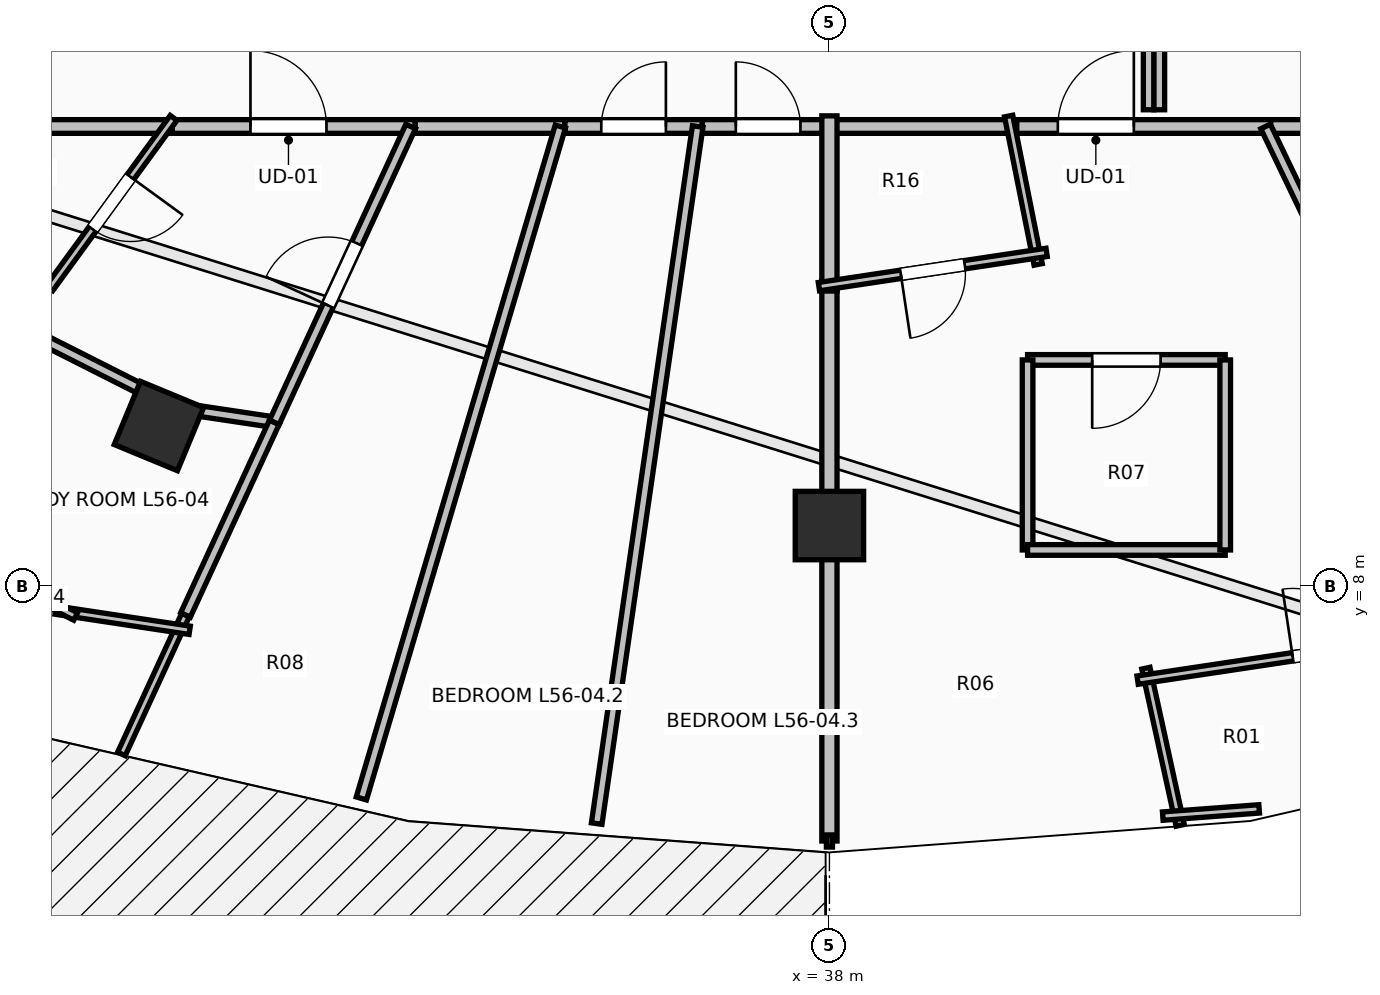
"""IFC4 building model, lengths in metres.
Left out: names, types, materials, properties, quantities, classifications, styles, units other than length and angle.
Written with IfcOpenShell. Run it as: python <this file> out.ifc"""

import sys

from ifc_helpers import new_model, si_unit, direction, frame, frame_2d, origin, origin_2d, place, context, subcontext, project, spatial, rectangle, extrude, element, fill, save


model = new_model("IFC4")
c1 = context("Model", 3, precision=1e-05, world=origin(), true_north=direction((0.0, 1.0)))
c2 = subcontext(c1, "Body", "Model", "MODEL_VIEW")
j1 = project(units=[si_unit("LENGTHUNIT", "METRE"), si_unit("PLANEANGLEUNIT", "RADIAN")], contexts=[c1])
p1 = place(None, origin())
s1 = spatial("IfcSite", under=j1, at=p1, CompositionType="ELEMENT")
p2 = place(p1, origin())
s2 = spatial("IfcBuilding", under=s1, at=p2, CompositionType="ELEMENT")
p3 = place(p2, frame((0.0, 0.0, 207.2)))
s3 = spatial("IfcBuildingStorey", under=s2, at=p3, CompositionType="ELEMENT", Elevation=207.2)
for number, where, z_axis, x_axis in (
    (1, (29.179, 10.109, 0.0), (0.0, 0.0, 1.0), (-0.383, -0.924, 0.0)),
    (2, (38.0, 8.8, 0.0), (0.0, 0.0, 1.0), (0.0, -1.0, 0.0)),
):
    element("IfcColumn", number, at=place(p3, frame(where, z_axis=z_axis, x_axis=x_axis)), inside=s3, PredefinedType="COLUMN", context=c2, shape_type="SweptSolid", body=[
        extrude(rectangle(XDim=0.9, YDim=0.9, at=origin_2d()), origin(), (0.0, 0.0, 1.0), 3.55),
    ])
p4 = place(p3, frame((29.215, 14.05, 0.0), z_axis=(0.0, 0.0, 1.0), x_axis=(1.0, 0.0, 0.0)))
e3 = element("IfcWall", 3, at=p4, inside=s3, PredefinedType="PARTITIONING", context=c2, shape_type="SweptSolid", body=[
    extrude(rectangle(XDim=3.336, YDim=0.18, at=frame_2d((1.668, 0.0))), origin(), (0.0, 0.0, 1.0), 2.936),
])
p5 = place(p4, frame((1.168, 0.0, 0.0)))
e4 = element("IfcOpeningElement", 4, at=p5, cuts=e3, PredefinedType="OPENING", context=c2, shape_type="SweptSolid", body=[
    extrude(rectangle(XDim=1.0, YDim=2.15, at=frame_2d((0.5, 1.075))), frame((0.0, 0.105, 0.0), z_axis=(0.0, -1.0, 0.0), x_axis=(1.0, 0.0, 0.0)), (0.0, 0.0, 1.0), 0.21),
])
p6 = place(p3, frame((25.97, 14.05, 0.0), z_axis=(0.0, 0.0, 1.0), x_axis=(1.0, 0.0, 0.0)))
e5 = element("IfcWall", 5, at=p6, inside=s3, PredefinedType="PARTITIONING", context=c2, shape_type="SweptSolid", body=[
    extrude(rectangle(XDim=3.385, YDim=0.18, at=frame_2d((1.692, 0.0))), origin(), (0.0, 0.0, 1.0), 2.482),
])
p7 = place(p3, frame((32.551, 14.05, 0.0), z_axis=(0.0, 0.0, 1.0), x_axis=(1.0, 0.0, 0.0)))
e6 = element("IfcWall", 6, at=p7, inside=s3, PredefinedType="PARTITIONING", context=c2, shape_type="SweptSolid", body=[
    extrude(rectangle(XDim=1.969, YDim=0.18, at=frame_2d((0.984, 0.0))), origin(), (0.0, 0.0, 1.0), 2.936),
])
p8 = place(p3, frame((34.52, 14.05, 0.0), z_axis=(0.0, 0.0, 1.0), x_axis=(1.0, 0.0, 0.0)))
e7 = element("IfcWall", 7, at=p8, inside=s3, PredefinedType="PARTITIONING", context=c2, shape_type="SweptSolid", body=[
    extrude(rectangle(XDim=1.807, YDim=0.18, at=frame_2d((0.903, 0.0))), origin(), (0.0, 0.0, 1.0), 2.936),
])
p9 = place(p8, frame((0.479, 0.0, 0.0)))
e8 = element("IfcOpeningElement", 8, at=p9, cuts=e7, PredefinedType="OPENING", context=c2, shape_type="SweptSolid", body=[
    extrude(rectangle(XDim=0.85, YDim=2.1, at=frame_2d((0.425, 1.05))), frame((0.0, 0.105, 0.0), z_axis=(0.0, -1.0, 0.0), x_axis=(1.0, 0.0, 0.0)), (0.0, 0.0, 1.0), 0.21),
])
p10 = place(p3, frame((36.327, 14.05, 0.0), z_axis=(0.0, 0.0, 1.0), x_axis=(1.0, 0.0, 0.0)))
e9 = element("IfcWall", 9, at=p10, inside=s3, PredefinedType="PARTITIONING", context=c2, shape_type="SweptSolid", body=[
    extrude(rectangle(XDim=1.733, YDim=0.18, at=frame_2d((0.867, 0.0))), origin(), (0.0, 0.0, 1.0), 2.936),
])
p11 = place(p10, frame((0.441, 0.0, 0.0)))
e10 = element("IfcOpeningElement", 10, at=p11, cuts=e9, PredefinedType="OPENING", context=c2, shape_type="SweptSolid", body=[
    extrude(rectangle(XDim=0.85, YDim=2.1, at=frame_2d((0.425, 1.05))), frame((0.0, 0.105, 0.0), z_axis=(0.0, -1.0, 0.0), x_axis=(1.0, 0.0, 0.0)), (0.0, 0.0, 1.0), 0.21),
])
p12 = place(p3, frame((40.325, 14.05, 0.0), z_axis=(0.0, 0.0, 1.0), x_axis=(1.0, 0.0, 0.0)))
e11 = element("IfcWall", 11, at=p12, inside=s3, PredefinedType="PARTITIONING", context=c2, shape_type="SweptSolid", body=[
    extrude(rectangle(XDim=3.48, YDim=0.18, at=frame_2d((1.74, 0.0))), origin(), (0.0, 0.0, 1.0), 2.936),
])
p13 = place(p12, frame((0.68, 0.0, 0.0)))
e12 = element("IfcOpeningElement", 12, at=p13, cuts=e11, PredefinedType="OPENING", context=c2, shape_type="SweptSolid", body=[
    extrude(rectangle(XDim=1.0, YDim=2.15, at=frame_2d((0.5, 1.075))), frame((0.0, 0.105, 0.0), z_axis=(0.0, -1.0, 0.0), x_axis=(1.0, 0.0, 0.0)), (0.0, 0.0, 1.0), 0.21),
])
p14 = place(p3, frame((37.92, 14.05, 0.0), z_axis=(0.0, 0.0, 1.0), x_axis=(1.0, 0.0, 0.0)))
e13 = element("IfcWall", 13, at=p14, inside=s3, PredefinedType="PARTITIONING", context=c2, shape_type="SweptSolid", body=[
    extrude(rectangle(XDim=2.545, YDim=0.18, at=frame_2d((1.272, 0.0))), origin(), (0.0, 0.0, 1.0), 2.936),
])
p15 = place(p3, frame((43.805, 14.05, 0.0), z_axis=(0.0, 0.0, 1.0), x_axis=(1.0, 0.0, 0.0)))
e14 = element("IfcWall", 14, at=p15, inside=s3, PredefinedType="PARTITIONING", context=c2, shape_type="SweptSolid", body=[
    extrude(rectangle(XDim=1.916, YDim=0.18, at=frame_2d((0.958, 0.0))), origin(), (0.0, 0.0, 1.0), 2.482),
])
p16 = place(p3, frame((29.372, 14.163, 0.0), z_axis=(0.0, 0.0, 1.0), x_axis=(-0.589066743954, -0.808084383693, 0.0)))
e15 = element("IfcWall", 15, at=p16, inside=s3, PredefinedType="PARTITIONING", context=c2, shape_type="SweptSolid", body=[
    extrude(rectangle(XDim=2.772, YDim=0.11, at=frame_2d((1.386, 0.0))), origin(), (0.0, 0.0, 1.0), 2.482),
])
p17 = place(p16, frame((0.961, 0.0, 0.0)))
e16 = element("IfcOpeningElement", 16, at=p17, cuts=e15, PredefinedType="OPENING", context=c2, shape_type="SweptSolid", body=[
    extrude(rectangle(XDim=0.85, YDim=2.1, at=frame_2d((0.425, 1.05))), frame((0.0, 0.07, 0.0), z_axis=(0.0, -1.0, 0.0), x_axis=(1.0, 0.0, 0.0)), (0.0, 0.0, 1.0), 0.14),
])
p18 = place(p3, frame((29.529, 7.624, 0.0), z_axis=(0.0, 0.0, 1.0), x_axis=(-0.418673802252, -0.908136689771, 0.0)))
e17 = element("IfcWall", 17, at=p18, inside=s3, PredefinedType="PARTITIONING", context=c2, shape_type="SweptSolid", body=[
    extrude(rectangle(XDim=2.014, YDim=0.11, at=frame_2d((1.007, 0.0))), origin(), (0.0, 0.0, 1.0), 3.29),
])
p19 = place(p3, frame((27.586, 11.28, 0.0), z_axis=(0.0, 0.0, 1.0), x_axis=(0.89250267167, -0.451042105643, 0.0)))
e18 = element("IfcWall", 18, at=p19, inside=s3, PredefinedType="PARTITIONING", context=c2, shape_type="SweptSolid", body=[
    extrude(rectangle(XDim=2.064, YDim=0.14, at=frame_2d((1.032, 0.0))), origin(), (0.0, 0.0, 1.0), 2.482),
])
p20 = place(p3, frame((29.428, 10.349, 0.0), z_axis=(0.0, 0.0, 1.0), x_axis=(0.988955881685, -0.148210202353, 0.0)))
e19 = element("IfcWall", 19, at=p20, inside=s3, PredefinedType="PARTITIONING", context=c2, shape_type="SweptSolid", body=[
    extrude(rectangle(XDim=1.283, YDim=0.14, at=frame_2d((0.642, 0.0))), origin(), (0.0, 0.0, 1.0), 3.29),
])
p21 = place(p3, frame((30.697, 10.159, 0.0), z_axis=(0.0, 0.0, 1.0), x_axis=(-0.41861439522, -0.908164075547, 0.0)))
e20 = element("IfcWall", 20, at=p21, inside=s3, PredefinedType="PARTITIONING", context=c2, shape_type="SweptSolid", body=[
    extrude(rectangle(XDim=2.791, YDim=0.14, at=frame_2d((1.396, 0.0))), origin(), (0.0, 0.0, 1.0), 2.824),
])
p22 = place(p3, frame((30.697, 10.159, 0.0), z_axis=(0.0, 0.0, 1.0), x_axis=(0.418635364892, 0.908154409372, 0.0)))
e21 = element("IfcWall", 21, at=p22, inside=s3, PredefinedType="PARTITIONING", context=c2, shape_type="SweptSolid", body=[
    extrude(rectangle(XDim=4.285, YDim=0.14, at=frame_2d((2.142, 0.0))), origin(), (0.0, 0.0, 1.0), 2.936),
])
p23 = place(p22, frame((1.692, 0.0, 0.0)))
e22 = element("IfcOpeningElement", 22, at=p23, cuts=e21, PredefinedType="OPENING", context=c2, shape_type="SweptSolid", body=[
    extrude(rectangle(XDim=0.9, YDim=2.1, at=frame_2d((0.45, 1.05))), frame((0.0, 0.085, 0.0), z_axis=(0.0, -1.0, 0.0), x_axis=(1.0, 0.0, 0.0)), (0.0, 0.0, 1.0), 0.17),
])
p24 = place(p3, frame((29.583, 7.422, 0.0), z_axis=(0.0, 0.0, 1.0), x_axis=(-0.988830695744, 0.149043131857, 0.0)))
e23 = element("IfcWall", 23, at=p24, inside=s3, PredefinedType="PARTITIONING", context=c2, shape_type="SweptSolid", body=[
    extrude(rectangle(XDim=1.784, YDim=0.11, at=frame_2d((0.892, 0.0))), origin(), (0.0, 0.0, 1.0), 3.29),
])
p25 = place(p3, frame((28.083, 7.604, 0.0), z_axis=(0.0, 0.0, 1.0), x_axis=(-0.892628057427, 0.450793911999, 0.0)))
e24 = element("IfcWall", 24, at=p25, inside=s3, PredefinedType="PARTITIONING", context=c2, shape_type="SweptSolid", body=[
    extrude(rectangle(XDim=2.698, YDim=0.11, at=frame_2d((1.349, 0.0))), origin(), (0.0, 0.0, 1.0), 3.29),
])
p26 = place(p3, frame((31.842, 5.21, 0.0), z_axis=(0.0, 0.0, 1.0), x_axis=(0.283952183478, 0.958838441813, 0.0)))
e25 = element("IfcWall", 25, at=p26, inside=s3, PredefinedType="PARTITIONING", context=c2, shape_type="SweptSolid", body=[
    extrude(rectangle(XDim=9.219, YDim=0.14, at=frame_2d((4.61, 0.0))), origin(), (0.0, 0.0, 1.0), 2.824),
])
p27 = place(p3, frame((34.938, 4.879, 0.0), z_axis=(0.0, 0.0, 1.0), x_axis=(0.143423836858, 0.989661357749, 0.0)))
e26 = element("IfcWall", 26, at=p27, inside=s3, PredefinedType="PARTITIONING", context=c2, shape_type="SweptSolid", body=[
    extrude(rectangle(XDim=9.267, YDim=0.14, at=frame_2d((4.633, 0.0))), origin(), (0.0, 0.0, 1.0), 2.824),
])
p28 = place(p3, frame((38.0, 4.65, 0.0), z_axis=(0.0, 0.0, 1.0), x_axis=(0.0, 1.0, 0.0)))
e27 = element("IfcWall", 27, at=p28, inside=s3, PredefinedType="PARTITIONING", context=c2, shape_type="SweptSolid", body=[
    extrude(rectangle(XDim=7.375, YDim=0.2, at=frame_2d((3.688, 0.0))), origin(), (0.0, 0.0, 1.0), 3.022),
])
p29 = place(p3, frame((38.0, 11.885, 0.0), z_axis=(0.0, 0.0, 1.0), x_axis=(0.0, 1.0, 0.0)))
e28 = element("IfcWall", 28, at=p29, inside=s3, PredefinedType="PARTITIONING", context=c2, shape_type="SweptSolid", body=[
    extrude(rectangle(XDim=2.305, YDim=0.2, at=frame_2d((1.152, 0.0))), origin(), (0.0, 0.0, 1.0), 2.936),
])
p30 = place(p3, frame((40.358, 14.187, 0.0), z_axis=(0.0, 0.0, 1.0), x_axis=(0.195313900905, -0.980740781304, 0.0)))
e29 = element("IfcWall", 29, at=p30, inside=s3, PredefinedType="PARTITIONING", context=c2, shape_type="SweptSolid", body=[
    extrude(rectangle(XDim=1.99, YDim=0.11, at=frame_2d((0.995, 0.0))), origin(), (0.0, 0.0, 1.0), 2.936),
])
p31 = place(p3, frame((40.857, 12.394, 0.0), z_axis=(0.0, 0.0, 1.0), x_axis=(-0.988873015636, -0.148762088409, 0.0)))
e30 = element("IfcWall", 30, at=p31, inside=s3, PredefinedType="PARTITIONING", context=c2, shape_type="SweptSolid", body=[
    extrude(rectangle(XDim=3.03, YDim=0.11, at=frame_2d((1.515, 0.0))), origin(), (0.0, 0.0, 1.0), 3.29),
])
p32 = place(p31, frame((1.09, 0.0, 0.0)))
e31 = element("IfcOpeningElement", 31, at=p32, cuts=e30, PredefinedType="OPENING", context=c2, shape_type="SweptSolid", body=[
    extrude(rectangle(XDim=0.85, YDim=2.1, at=frame_2d((0.425, 1.05))), frame((0.0, 0.07, 0.0), z_axis=(0.0, -1.0, 0.0), x_axis=(1.0, 0.0, 0.0)), (0.0, 0.0, 1.0), 0.14),
])
p33 = place(p3, frame((42.615, 4.856, 0.0), z_axis=(0.0, 0.0, 1.0), x_axis=(-0.213521424511, 0.976938381514, 0.0)))
e32 = element("IfcWall", 32, at=p33, inside=s3, PredefinedType="PARTITIONING", context=c2, shape_type="SweptSolid", body=[
    extrude(rectangle(XDim=2.116, YDim=0.11, at=frame_2d((1.058, 0.0))), origin(), (0.0, 0.0, 1.0), 3.29),
])
p34 = place(p3, frame((42.055, 6.766, 0.0), z_axis=(0.0, 0.0, 1.0), x_axis=(0.988872134662, 0.148767944424, 0.0)))
e33 = element("IfcWall", 33, at=p34, inside=s3, PredefinedType="PARTITIONING", context=c2, shape_type="SweptSolid", body=[
    extrude(rectangle(XDim=5.027, YDim=0.11, at=frame_2d((2.513, 0.0))), origin(), (0.0, 0.0, 1.0), 3.29),
])
p35 = place(p34, frame((2.063, 0.0, 0.0)))
e34 = element("IfcOpeningElement", 34, at=p35, cuts=e33, PredefinedType="OPENING", context=c2, shape_type="SweptSolid", body=[
    extrude(rectangle(XDim=0.9, YDim=2.1, at=frame_2d((0.45, 1.05))), frame((0.0, 0.07, 0.0), z_axis=(0.0, -1.0, 0.0), x_axis=(1.0, 0.0, 0.0)), (0.0, 0.0, 1.0), 0.14),
])
p36 = place(p3, frame((42.385, 4.978, 0.0), z_axis=(0.0, 0.0, 1.0), x_axis=(0.997207179737, 0.074684942803, 0.0)))
e35 = element("IfcWall", 35, at=p36, inside=s3, PredefinedType="PARTITIONING", context=c2, shape_type="SweptSolid", body=[
    extrude(rectangle(XDim=1.272, YDim=0.11, at=frame_2d((0.636, 0.0))), origin(), (0.0, 0.0, 1.0), 3.29),
])
p37 = place(p3, frame((43.207, 10.979, 0.0), z_axis=(0.0, 0.0, 1.0), x_axis=(-1.0, 0.0, 0.0)))
e36 = element("IfcWall", 36, at=p37, inside=s3, PredefinedType="PARTITIONING", context=c2, shape_type="SweptSolid", body=[
    extrude(rectangle(XDim=2.6, YDim=0.14, at=frame_2d((1.3, 0.0))), origin(), (0.0, 0.0, 1.0), 2.482),
])
p38 = place(p37, frame((0.85, 0.0, 0.0)))
e37 = element("IfcOpeningElement", 37, at=p38, cuts=e36, PredefinedType="OPENING", context=c2, shape_type="SweptSolid", body=[
    extrude(rectangle(XDim=0.9, YDim=2.1, at=frame_2d((0.45, 1.05))), frame((0.0, 0.085, 0.0), z_axis=(0.0, -1.0, 0.0), x_axis=(1.0, 0.0, 0.0)), (0.0, 0.0, 1.0), 0.17),
])
p39 = place(p3, frame((40.607, 10.979, 0.0), z_axis=(0.0, 0.0, 1.0), x_axis=(0.0, -1.0, 0.0)))
e38 = element("IfcWall", 38, at=p39, inside=s3, PredefinedType="PARTITIONING", context=c2, shape_type="SweptSolid", body=[
    extrude(rectangle(XDim=2.5, YDim=0.14, at=frame_2d((1.25, 0.0))), origin(), (0.0, 0.0, 1.0), 2.482),
])
p40 = place(p3, frame((40.607, 8.479, 0.0), z_axis=(0.0, 0.0, 1.0), x_axis=(1.0, 0.0, 0.0)))
e39 = element("IfcWall", 39, at=p40, inside=s3, PredefinedType="PARTITIONING", context=c2, shape_type="SweptSolid", body=[
    extrude(rectangle(XDim=2.6, YDim=0.14, at=frame_2d((1.3, 0.0))), origin(), (0.0, 0.0, 1.0), 3.29),
])
p41 = place(p3, frame((43.207, 8.479, 0.0), z_axis=(0.0, 0.0, 1.0), x_axis=(0.0, 1.0, 0.0)))
e40 = element("IfcWall", 40, at=p41, inside=s3, PredefinedType="PARTITIONING", context=c2, shape_type="SweptSolid", body=[
    extrude(rectangle(XDim=2.5, YDim=0.14, at=frame_2d((1.25, 0.0))), origin(), (0.0, 0.0, 1.0), 2.824),
])
p42 = place(p3, frame((46.887, 7.493, 0.0), z_axis=(0.0, 0.0, 1.0), x_axis=(-0.43289909466, 0.901442385204, 0.0)))
e41 = element("IfcWall", 41, at=p42, inside=s3, PredefinedType="PARTITIONING", context=c2, shape_type="SweptSolid", body=[
    extrude(rectangle(XDim=7.274, YDim=0.14, at=frame_2d((3.637, 0.0))), origin(), (0.0, 0.0, 1.0), 2.482),
])
p43 = place(p42, frame((3.187, 0.0, 0.0)))
e42 = element("IfcOpeningElement", 42, at=p43, cuts=e41, PredefinedType="OPENING", context=c2, shape_type="SweptSolid", body=[
    extrude(rectangle(XDim=0.9, YDim=2.1, at=frame_2d((0.45, 1.05))), frame((0.0, 0.085, 0.0), z_axis=(0.0, -1.0, 0.0), x_axis=(1.0, 0.0, 0.0)), (0.0, 0.0, 1.0), 0.17),
])
for number, where, z_axis, x_axis in (
    (43, (42.2, 16.1, 0.0), (0.0, 0.0, 1.0), (0.0, -1.0, 0.0)),
    (44, (42.34, 14.27, 0.0), (0.0, 0.0, 1.0), (0.0, 1.0, 0.0)),
):
    element("IfcWall", number, at=place(p3, frame(where, z_axis=z_axis, x_axis=x_axis)), inside=s3, PredefinedType="PARTITIONING", context=c2, shape_type="SweptSolid", body=[
        extrude(rectangle(XDim=1.83, YDim=0.14, at=frame_2d((0.915, 0.0))), origin(), (0.0, 0.0, 1.0), 3.29),
    ])
p44 = place(p5, origin())
e45 = element("IfcDoor", 45, at=p44, inside=s3, OperationType="SINGLE_SWING_LEFT", PredefinedType="DOOR", context=c2, shape_type="SweptSolid", body=[
    extrude(rectangle(XDim=1.0, YDim=2.15, at=frame_2d((0.5, 1.075))), frame((0.0, 0.025, 0.0), z_axis=(0.0, -1.0, 0.0), x_axis=(1.0, 0.0, 0.0)), (0.0, 0.0, 1.0), 0.05),
])
fill(e4, e45)
p45 = place(p13, origin())
e46 = element("IfcDoor", 46, at=p45, inside=s3, OperationType="SINGLE_SWING_RIGHT", PredefinedType="DOOR", context=c2, shape_type="SweptSolid", body=[
    extrude(rectangle(XDim=1.0, YDim=2.15, at=frame_2d((0.5, 1.075))), frame((0.0, 0.025, 0.0), z_axis=(0.0, -1.0, 0.0), x_axis=(1.0, 0.0, 0.0)), (0.0, 0.0, 1.0), 0.05),
])
fill(e12, e46)
p46 = place(p17, origin())
e47 = element("IfcDoor", 47, at=p46, inside=s3, OperationType="SINGLE_SWING_LEFT", PredefinedType="DOOR", context=c2, shape_type="SweptSolid", body=[
    extrude(rectangle(XDim=0.85, YDim=2.1, at=frame_2d((0.425, 1.05))), frame((0.0, 0.025, 0.0), z_axis=(0.0, -1.0, 0.0), x_axis=(1.0, 0.0, 0.0)), (0.0, 0.0, 1.0), 0.05),
])
fill(e16, e47)
p47 = place(p23, origin())
e48 = element("IfcDoor", 48, at=p47, inside=s3, OperationType="SINGLE_SWING_LEFT", PredefinedType="DOOR", context=c2, shape_type="SweptSolid", body=[
    extrude(rectangle(XDim=0.9, YDim=2.1, at=frame_2d((0.45, 1.05))), frame((0.0, 0.025, 0.0), z_axis=(0.0, -1.0, 0.0), x_axis=(1.0, 0.0, 0.0)), (0.0, 0.0, 1.0), 0.05),
])
fill(e22, e48)
p48 = place(p32, origin())
e49 = element("IfcDoor", 49, at=p48, inside=s3, OperationType="SINGLE_SWING_RIGHT", PredefinedType="DOOR", context=c2, shape_type="SweptSolid", body=[
    extrude(rectangle(XDim=0.85, YDim=2.1, at=frame_2d((0.425, 1.05))), frame((0.0, 0.025, 0.0), z_axis=(0.0, -1.0, 0.0), x_axis=(1.0, 0.0, 0.0)), (0.0, 0.0, 1.0), 0.05),
])
fill(e31, e49)
p49 = place(p35, origin())
e50 = element("IfcDoor", 50, at=p49, inside=s3, OperationType="SINGLE_SWING_LEFT", PredefinedType="DOOR", context=c2, shape_type="SweptSolid", body=[
    extrude(rectangle(XDim=0.9, YDim=2.1, at=frame_2d((0.45, 1.05))), frame((0.0, 0.025, 0.0), z_axis=(0.0, -1.0, 0.0), x_axis=(1.0, 0.0, 0.0)), (0.0, 0.0, 1.0), 0.05),
])
fill(e34, e50)
p50 = place(p38, origin())
e51 = element("IfcDoor", 51, at=p50, inside=s3, OperationType="SINGLE_SWING_RIGHT", PredefinedType="DOOR", context=c2, shape_type="SweptSolid", body=[
    extrude(rectangle(XDim=0.9, YDim=2.1, at=frame_2d((0.45, 1.05))), frame((0.0, 0.025, 0.0), z_axis=(0.0, -1.0, 0.0), x_axis=(1.0, 0.0, 0.0)), (0.0, 0.0, 1.0), 0.05),
])
fill(e37, e51)
p51 = place(p9, origin())
e52 = element("IfcDoor", 52, at=p51, inside=s3, OperationType="SINGLE_SWING_RIGHT", PredefinedType="DOOR", context=c2, shape_type="SweptSolid", body=[
    extrude(rectangle(XDim=0.85, YDim=2.1, at=frame_2d((0.425, 1.05))), frame((0.0, 0.025, 0.0), z_axis=(0.0, -1.0, 0.0), x_axis=(1.0, 0.0, 0.0)), (0.0, 0.0, 1.0), 0.05),
])
fill(e8, e52)
p52 = place(p11, origin())
e53 = element("IfcDoor", 53, at=p52, inside=s3, OperationType="SINGLE_SWING_LEFT", PredefinedType="DOOR", context=c2, shape_type="SweptSolid", body=[
    extrude(rectangle(XDim=0.85, YDim=2.1, at=frame_2d((0.425, 1.05))), frame((0.0, 0.025, 0.0), z_axis=(0.0, -1.0, 0.0), x_axis=(1.0, 0.0, 0.0)), (0.0, 0.0, 1.0), 0.05),
])
fill(e10, e53)
save(model, sys.argv[1])
